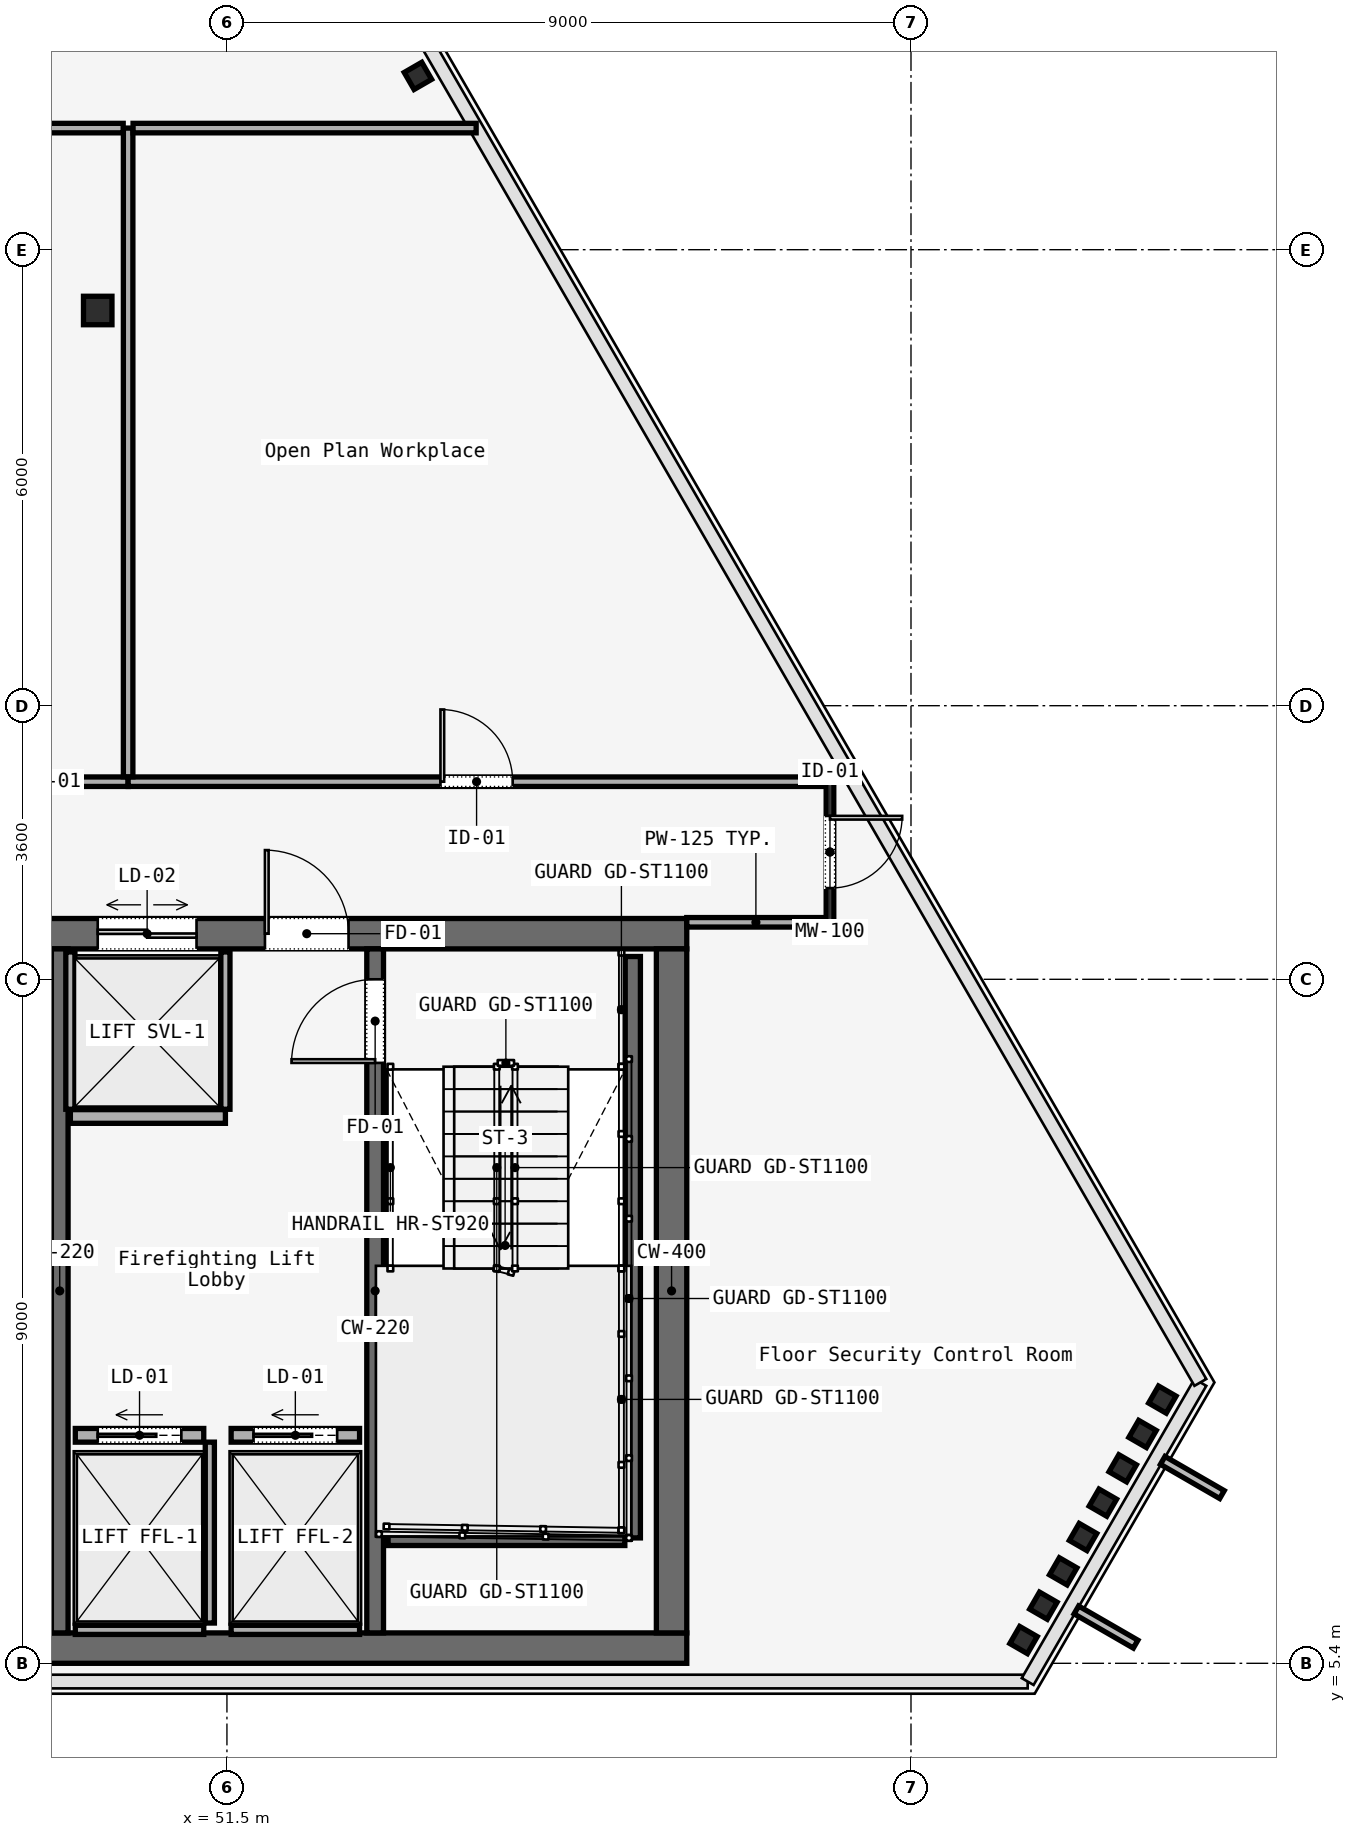
"""IFC4 building model, lengths in metres.
Left out: names, types, materials, properties, quantities, classifications, styles, units other than length and angle.
Written with IfcOpenShell. Run it as: python <this file> out.ifc"""

import sys

from ifc_helpers import new_model, si_unit, direction, frame, frame_2d, origin, origin_2d, place, context, subcontext, project, spatial, rectangle, i_section, extrude, element, fill, save


model = new_model("IFC4")
c1 = context("Model", 3, precision=1e-05, world=origin(), true_north=direction((0.0, 1.0)))
c2 = subcontext(c1, "Body", "Model", "MODEL_VIEW")
j1 = project(units=[si_unit("LENGTHUNIT", "METRE"), si_unit("PLANEANGLEUNIT", "RADIAN")], contexts=[c1])
p1 = place(None, origin())
s1 = spatial("IfcSite", under=j1, at=p1, CompositionType="ELEMENT")
p2 = place(p1, origin())
s2 = spatial("IfcBuilding", under=s1, at=p2, CompositionType="ELEMENT")
p3 = place(p2, frame((0.0, 0.0, 290.9)))
s3 = spatial("IfcBuildingStorey", under=s2, at=p3, CompositionType="ELEMENT", Elevation=290.9)
p4 = place(p3, frame((26.45, 15.0, 0.0), z_axis=(0.0, 0.0, 1.0), x_axis=(1.0, 0.0, 0.0)))
e1 = element("IfcWall", 1, at=p4, inside=s3, PredefinedType="SOLIDWALL", context=c2, shape_type="SweptSolid", body=[
    extrude(rectangle(XDim=31.1, YDim=0.4, at=frame_2d((15.55, 0.0))), origin(), (0.0, 0.0, 1.0), 3.58),
])
p5 = place(p4, frame((1.65, 0.0, 0.0)))
e2 = element("IfcOpeningElement", 2, at=p5, cuts=e1, PredefinedType="OPENING", context=c2, shape_type="SweptSolid", body=[
    extrude(rectangle(XDim=1.1, YDim=2.2, at=frame_2d((0.55, 1.1))), frame((0.0, 0.2, 0.0), z_axis=(0.0, -1.0, 0.0), x_axis=(1.0, 0.0, 0.0)), (0.0, 0.0, 1.0), 0.4),
])
p6 = place(p4, frame((13.65, 0.0, 0.0)))
e3 = element("IfcOpeningElement", 3, at=p6, cuts=e1, PredefinedType="OPENING", context=c2, shape_type="SweptSolid", body=[
    extrude(rectangle(XDim=1.1, YDim=2.2, at=frame_2d((0.55, 1.1))), frame((0.0, 0.2, 0.0), z_axis=(0.0, -1.0, 0.0), x_axis=(1.0, 0.0, 0.0)), (0.0, 0.0, 1.0), 0.4),
])
p7 = place(p4, frame((25.55, 0.0, 0.0)))
e4 = element("IfcOpeningElement", 4, at=p7, cuts=e1, PredefinedType="OPENING", context=c2, shape_type="SweptSolid", body=[
    extrude(rectangle(XDim=1.1, YDim=2.2, at=frame_2d((0.55, 1.1))), frame((0.0, 0.2, 0.0), z_axis=(0.0, -1.0, 0.0), x_axis=(1.0, 0.0, 0.0)), (0.0, 0.0, 1.0), 0.4),
])
p8 = place(p4, frame((19.35, 0.0, 0.0)))
e5 = element("IfcOpeningElement", 5, at=p8, cuts=e1, PredefinedType="OPENING", context=c2, shape_type="SweptSolid", body=[
    extrude(rectangle(XDim=1.1, YDim=2.2, at=frame_2d((0.55, 1.1))), frame((0.0, 0.2, 0.0), z_axis=(0.0, -1.0, 0.0), x_axis=(1.0, 0.0, 0.0)), (0.0, 0.0, 1.0), 0.4),
])
p9 = place(p4, frame((21.4, 0.0, 0.0)))
e6 = element("IfcOpeningElement", 6, at=p9, cuts=e1, PredefinedType="OPENING", context=c2, shape_type="SweptSolid", body=[
    extrude(rectangle(XDim=0.9, YDim=2.1, at=frame_2d((0.45, 1.05))), frame((0.0, 0.2, 0.0), z_axis=(0.0, -1.0, 0.0), x_axis=(1.0, 0.0, 0.0)), (0.0, 0.0, 1.0), 0.4),
])
p10 = place(p4, frame((5.54, 0.0, 0.0)))
e7 = element("IfcOpeningElement", 7, at=p10, cuts=e1, PredefinedType="OPENING", context=c2, shape_type="SweptSolid", body=[
    extrude(rectangle(XDim=0.95, YDim=2.2, at=frame_2d((0.475, 1.1))), frame((0.0, 0.2, 0.0), z_axis=(0.0, -1.0, 0.0), x_axis=(1.0, 0.0, 0.0)), (0.0, 0.0, 1.0), 0.4),
])
p11 = place(p4, frame((9.49, 0.0, 0.0)))
e8 = element("IfcOpeningElement", 8, at=p11, cuts=e1, PredefinedType="OPENING", context=c2, shape_type="SweptSolid", body=[
    extrude(rectangle(XDim=0.95, YDim=2.2, at=frame_2d((0.475, 1.1))), frame((0.0, 0.2, 0.0), z_axis=(0.0, -1.0, 0.0), x_axis=(1.0, 0.0, 0.0)), (0.0, 0.0, 1.0), 0.4),
])
p12 = place(p4, frame((23.35, 0.0, 0.0)))
e9 = element("IfcOpeningElement", 9, at=p12, cuts=e1, PredefinedType="OPENING", context=c2, shape_type="SweptSolid", body=[
    extrude(rectangle(XDim=1.3, YDim=2.3, at=frame_2d((0.65, 1.15))), frame((0.0, 0.2, 0.0), z_axis=(0.0, -1.0, 0.0), x_axis=(1.0, 0.0, 0.0)), (0.0, 0.0, 1.0), 0.4),
])
p13 = place(p3, frame((26.45, 5.6, 0.0), z_axis=(0.0, 0.0, 1.0), x_axis=(1.0, 0.0, 0.0)))
e10 = element("IfcWall", 10, at=p13, inside=s3, PredefinedType="SOLIDWALL", context=c2, shape_type="SweptSolid", body=[
    extrude(rectangle(XDim=31.1, YDim=0.4, at=frame_2d((15.55, 0.0))), origin(), (0.0, 0.0, 1.0), 3.58),
])
p14 = place(p3, frame((57.35, 5.8, 0.0), z_axis=(0.0, 0.0, 1.0), x_axis=(0.0, 1.0, 0.0)))
e11 = element("IfcWall", 11, at=p14, inside=s3, PredefinedType="SOLIDWALL", context=c2, shape_type="SweptSolid", body=[
    extrude(rectangle(XDim=9.0, YDim=0.4, at=frame_2d((4.5, 0.0))), origin(), (0.0, 0.0, 1.0), 3.58),
])
p15 = place(p3, frame((49.3, 5.8, 0.0), z_axis=(0.0, 0.0, 1.0), x_axis=(0.0, 1.0, 0.0)))
e12 = element("IfcWall", 12, at=p15, inside=s3, PredefinedType="SOLIDWALL", context=c2, shape_type="SweptSolid", body=[
    extrude(rectangle(XDim=9.0, YDim=0.22, at=frame_2d((4.5, 0.0))), origin(), (0.0, 0.0, 1.0), 3.58),
])
p16 = place(p3, frame((53.45, 5.8, 0.0), z_axis=(0.0, 0.0, 1.0), x_axis=(0.0, 1.0, 0.0)))
e13 = element("IfcWall", 13, at=p16, inside=s3, PredefinedType="SOLIDWALL", context=c2, shape_type="SweptSolid", body=[
    extrude(rectangle(XDim=9.0, YDim=0.22, at=frame_2d((4.5, 0.0))), origin(), (0.0, 0.0, 1.0), 3.58),
])
p17 = place(p16, frame((7.5, 0.0, 0.0)))
e14 = element("IfcOpeningElement", 14, at=p17, cuts=e13, PredefinedType="OPENING", context=c2, shape_type="SweptSolid", body=[
    extrude(rectangle(XDim=1.1, YDim=2.2, at=frame_2d((0.55, 1.1))), frame((0.0, 0.11, 0.0), z_axis=(0.0, -1.0, 0.0), x_axis=(1.0, 0.0, 0.0)), (0.0, 0.0, 1.0), 0.22),
])
p18 = place(p3, frame((49.8, 23.2, 0.0), z_axis=(0.0, 0.0, 1.0), x_axis=(1.0, 0.0, 0.0)))
e15 = element("IfcColumn", 15, at=p18, inside=s3, PredefinedType="COLUMN", context=c2, shape_type="SweptSolid", body=[
    extrude(i_section(OverallWidth=0.375, OverallDepth=0.375, WebThickness=0.017, FlangeThickness=0.027, FilletRadius=0.015, at=origin_2d()), origin(), (0.0, 0.0, 1.0), 3.58),
])
p19 = place(p3, frame((61.981, 5.706, 0.0), z_axis=(0.012750869074, -0.008046002945, 0.999886332127), x_axis=(-0.46549137214, 0.884956095151, 0.013057263081)))
e16 = element("IfcColumn", 16, at=p19, inside=s3, PredefinedType="COLUMN", context=c2, shape_type="SweptSolid", body=[
    extrude(i_section(OverallWidth=0.259, OverallDepth=0.267, WebThickness=0.013, FlangeThickness=0.021, FilletRadius=0.013, at=origin_2d()), origin(), (0.0, 0.0, 1.0), 3.581),
])
p20 = place(p3, frame((62.242, 6.158, 0.0), z_axis=(0.003476876794, -0.024065441336, 0.999704339223), x_axis=(0.371064507273, 0.928368302905, 0.021057673285)))
e17 = element("IfcColumn", 17, at=p20, inside=s3, PredefinedType="COLUMN", context=c2, shape_type="SweptSolid", body=[
    extrude(i_section(OverallWidth=0.259, OverallDepth=0.267, WebThickness=0.013, FlangeThickness=0.021, FilletRadius=0.013, at=origin_2d()), origin(), (0.0, 0.0, 1.0), 3.581),
])
p21 = place(p3, frame((62.503, 6.61, 0.0), z_axis=(-0.005791741097, -0.040133358895, 0.999177546404), x_axis=(0.618468463563, 0.785024577009, 0.035116564052)))
e18 = element("IfcColumn", 18, at=p21, inside=s3, PredefinedType="COLUMN", context=c2, shape_type="SweptSolid", body=[
    extrude(i_section(OverallWidth=0.259, OverallDepth=0.267, WebThickness=0.013, FlangeThickness=0.021, FilletRadius=0.013, at=origin_2d()), origin(), (0.0, 0.0, 1.0), 3.583),
])
p22 = place(p3, frame((62.764, 7.062, 0.0), z_axis=(-0.01504542395, -0.056165044156, 0.998308130305), x_axis=(0.706681200924, 0.705737927659, 0.050355314766)))
e19 = element("IfcColumn", 19, at=p22, inside=s3, PredefinedType="COLUMN", context=c2, shape_type="SweptSolid", body=[
    extrude(i_section(OverallWidth=0.259, OverallDepth=0.267, WebThickness=0.013, FlangeThickness=0.021, FilletRadius=0.013, at=origin_2d()), origin(), (0.0, 0.0, 1.0), 3.586),
])
p23 = place(p3, frame((63.025, 7.514, 0.0), z_axis=(-0.024274823165, -0.072076505755, 0.997103660749), x_axis=(0.749462086186, 0.658762752498, 0.065865144737)))
e20 = element("IfcColumn", 20, at=p23, inside=s3, PredefinedType="COLUMN", context=c2, shape_type="SweptSolid", body=[
    extrude(i_section(OverallWidth=0.259, OverallDepth=0.267, WebThickness=0.013, FlangeThickness=0.021, FilletRadius=0.013, at=origin_2d()), origin(), (0.0, 0.0, 1.0), 3.591),
])
p24 = place(p3, frame((63.286, 7.966, 0.0), z_axis=(-0.033470647913, -0.087919856081, 0.995565073029), x_axis=(0.774036446069, 0.627877329686, 0.081471706891)))
e21 = element("IfcColumn", 21, at=p24, inside=s3, PredefinedType="COLUMN", context=c2, shape_type="SweptSolid", body=[
    extrude(i_section(OverallWidth=0.259, OverallDepth=0.267, WebThickness=0.013, FlangeThickness=0.021, FilletRadius=0.013, at=origin_2d()), origin(), (0.0, 0.0, 1.0), 3.596),
])
p25 = place(p3, frame((63.546, 8.418, 0.0), z_axis=(-0.042555860906, -0.103746851986, 0.993692904979), x_axis=(0.789181806641, 0.606433234677, 0.097112347031)))
e22 = element("IfcColumn", 22, at=p25, inside=s3, PredefinedType="COLUMN", context=c2, shape_type="SweptSolid", body=[
    extrude(i_section(OverallWidth=0.259, OverallDepth=0.267, WebThickness=0.013, FlangeThickness=0.021, FilletRadius=0.013, at=origin_2d()), origin(), (0.0, 0.0, 1.0), 3.603),
])
p26 = place(p3, frame((63.807, 8.87, 0.0), z_axis=(-0.051724991926, -0.119406974825, 0.991497100134), x_axis=(0.80011318397, 0.589167860222, 0.112694832712)))
e23 = element("IfcColumn", 23, at=p26, inside=s3, PredefinedType="COLUMN", context=c2, shape_type="SweptSolid", body=[
    extrude(i_section(OverallWidth=0.259, OverallDepth=0.267, WebThickness=0.013, FlangeThickness=0.021, FilletRadius=0.013, at=origin_2d()), origin(), (0.0, 0.0, 1.0), 3.611),
])
p27 = place(p3, frame((54.013, 26.287, 0.0), z_axis=(-0.064911794707, -0.112513777493, 0.991527664154), x_axis=(-0.003987046067, 0.993644521472, 0.112492970506)))
e24 = element("IfcColumn", 24, at=p27, inside=s3, PredefinedType="COLUMN", context=c2, shape_type="SweptSolid", body=[
    extrude(i_section(OverallWidth=0.259, OverallDepth=0.267, WebThickness=0.013, FlangeThickness=0.021, FilletRadius=0.013, at=origin_2d()), origin(), (0.0, 0.0, 1.0), 3.611),
])
p28 = place(p3, frame((56.84, 14.7, 0.0), z_axis=(0.0, 0.0, 1.0), x_axis=(0.0, -1.0, 0.0)))
e25 = element("IfcWall", 25, at=p28, inside=s3, PredefinedType="SOLIDWALL", context=c2, shape_type="SweptSolid", body=[
    extrude(rectangle(XDim=7.65, YDim=0.2, at=frame_2d((3.825, 0.0))), origin(), (0.0, 0.0, 1.0), 3.8),
])
p29 = place(p3, frame((53.62, 7.05, 0.0), z_axis=(0.0, 0.0, 1.0), x_axis=(1.0, 0.0, 0.0)))
e26 = element("IfcWall", 26, at=p29, inside=s3, PredefinedType="SOLIDWALL", context=c2, shape_type="SweptSolid", body=[
    extrude(rectangle(XDim=3.115, YDim=0.2, at=frame_2d((1.558, 0.0))), origin(), (0.0, 0.0, 1.0), 3.8),
])
p30 = place(p3, frame((49.505, 8.4, 0.0), z_axis=(0.0, 0.0, 1.0), x_axis=(1.0, 0.0, 0.0)))
e27 = element("IfcWall", 27, at=p30, inside=s3, PredefinedType="SOLIDWALL", context=c2, shape_type="SweptSolid", body=[
    extrude(rectangle(XDim=1.69, YDim=0.18, at=frame_2d((0.845, 0.0))), origin(), (0.0, 0.0, 1.0), 3.01),
])
p31 = place(p30, frame((0.295, 0.0, 0.0)))
e28 = element("IfcOpeningElement", 28, at=p31, cuts=e27, PredefinedType="OPENING", context=c2, shape_type="SweptSolid", body=[
    extrude(rectangle(XDim=1.1, YDim=2.2, at=frame_2d((0.55, 1.1))), frame((0.0, 0.09, 0.0), z_axis=(0.0, -1.0, 0.0), x_axis=(1.0, 0.0, 0.0)), (0.0, 0.0, 1.0), 0.18),
])
p32 = place(p3, frame((49.505, 5.84, 0.0), z_axis=(0.0, 0.0, 1.0), x_axis=(1.0, 0.0, 0.0)))
e29 = element("IfcWall", 29, at=p32, inside=s3, PredefinedType="SOLIDWALL", context=c2, shape_type="SweptSolid", body=[
    extrude(rectangle(XDim=1.69, YDim=0.12, at=frame_2d((0.845, 0.0))), origin(), (0.0, 0.0, 1.0), 3.01),
])
p33 = place(p3, frame((51.275, 5.93, 0.0), z_axis=(0.0, 0.0, 1.0), x_axis=(0.0, 1.0, 0.0)))
e30 = element("IfcWall", 30, at=p33, inside=s3, PredefinedType="SOLIDWALL", context=c2, shape_type="SweptSolid", body=[
    extrude(rectangle(XDim=2.38, YDim=0.12, at=frame_2d((1.19, 0.0))), origin(), (0.0, 0.0, 1.0), 3.01),
])
p34 = place(p3, frame((51.555, 8.4, 0.0), z_axis=(0.0, 0.0, 1.0), x_axis=(1.0, 0.0, 0.0)))
e31 = element("IfcWall", 31, at=p34, inside=s3, PredefinedType="SOLIDWALL", context=c2, shape_type="SweptSolid", body=[
    extrude(rectangle(XDim=1.69, YDim=0.18, at=frame_2d((0.845, 0.0))), origin(), (0.0, 0.0, 1.0), 3.01),
])
p35 = place(p34, frame((0.295, 0.0, 0.0)))
e32 = element("IfcOpeningElement", 32, at=p35, cuts=e31, PredefinedType="OPENING", context=c2, shape_type="SweptSolid", body=[
    extrude(rectangle(XDim=1.1, YDim=2.2, at=frame_2d((0.55, 1.1))), frame((0.0, 0.09, 0.0), z_axis=(0.0, -1.0, 0.0), x_axis=(1.0, 0.0, 0.0)), (0.0, 0.0, 1.0), 0.18),
])
p36 = place(p3, frame((51.555, 5.84, 0.0), z_axis=(0.0, 0.0, 1.0), x_axis=(1.0, 0.0, 0.0)))
e33 = element("IfcWall", 33, at=p36, inside=s3, PredefinedType="SOLIDWALL", context=c2, shape_type="SweptSolid", body=[
    extrude(rectangle(XDim=1.69, YDim=0.12, at=frame_2d((0.845, 0.0))), origin(), (0.0, 0.0, 1.0), 3.01),
])
p37 = place(p3, frame((49.44, 12.595, 0.0), z_axis=(0.0, 0.0, 1.0), x_axis=(1.0, 0.0, 0.0)))
e34 = element("IfcWall", 34, at=p37, inside=s3, PredefinedType="SOLIDWALL", context=c2, shape_type="SweptSolid", body=[
    extrude(rectangle(XDim=2.04, YDim=0.18, at=frame_2d((1.02, 0.0))), origin(), (0.0, 0.0, 1.0), 3.01),
])
for number, where, z_axis, x_axis in (
    (35, (49.44, 12.69, 0.0), (0.0, 0.0, 1.0), (0.0, 1.0, 0.0)),
    (36, (51.48, 12.69, 0.0), (0.0, 0.0, 1.0), (0.0, 1.0, 0.0)),
):
    element("IfcWall", number, at=place(p3, frame(where, z_axis=z_axis, x_axis=x_axis)), inside=s3, PredefinedType="SOLIDWALL", context=c2, shape_type="SweptSolid", body=[
        extrude(rectangle(XDim=2.07, YDim=0.12, at=frame_2d((1.035, 0.0))), origin(), (0.0, 0.0, 1.0), 3.01),
    ])
p38 = place(p3, frame((59.434, 17.0, 0.0), z_axis=(0.0, 0.0, 1.0), x_axis=(0.0, -1.0, 0.0)))
e37 = element("IfcWall", 37, at=p38, inside=s3, PredefinedType="MOVABLE", context=c2, shape_type="SweptSolid", body=[
    extrude(rectangle(XDim=1.85, YDim=0.1, at=frame_2d((0.925, 0.0))), origin(), (0.0, 0.0, 1.0), 3.01),
])
p39 = place(p38, frame((0.45, 0.0, 0.0)))
e38 = element("IfcOpeningElement", 38, at=p39, cuts=e37, PredefinedType="OPENING", context=c2, shape_type="SweptSolid", body=[
    extrude(rectangle(XDim=0.95, YDim=2.2, at=frame_2d((0.475, 1.1))), frame((0.0, 0.05, 0.0), z_axis=(0.0, -1.0, 0.0), x_axis=(1.0, 0.0, 0.0)), (0.0, 0.0, 1.0), 0.1),
])
p40 = place(p3, frame((59.369, 15.15, 0.0), z_axis=(0.0, 0.0, 1.0), x_axis=(-1.0, 0.0, 0.0)))
e39 = element("IfcWall", 39, at=p40, inside=s3, PredefinedType="PARTITIONING", context=c2, shape_type="SweptSolid", body=[
    extrude(rectangle(XDim=1.819, YDim=0.125, at=frame_2d((0.909, 0.0))), origin(), (0.0, 0.0, 1.0), 3.01),
])
p41 = place(p3, frame((45.4, 17.0, 0.0), z_axis=(0.0, 0.0, 1.0), x_axis=(1.0, 0.0, 0.0)))
e40 = element("IfcWall", 40, at=p41, inside=s3, PredefinedType="PARTITIONING", context=c2, shape_type="SweptSolid", body=[
    extrude(rectangle(XDim=4.8, YDim=0.125, at=frame_2d((2.4, 0.0))), origin(), (0.0, 0.0, 1.0), 3.01),
])
p42 = place(p41, frame((1.925, 0.0, 0.0)))
e41 = element("IfcOpeningElement", 41, at=p42, cuts=e40, PredefinedType="OPENING", context=c2, shape_type="SweptSolid", body=[
    extrude(rectangle(XDim=0.95, YDim=2.2, at=frame_2d((0.475, 1.1))), frame((0.0, 0.062, 0.0), z_axis=(0.0, -1.0, 0.0), x_axis=(1.0, 0.0, 0.0)), (0.0, 0.0, 1.0), 0.125),
])
p43 = place(p3, frame((50.2, 17.0, 0.0), z_axis=(0.0, 0.0, 1.0), x_axis=(1.0, 0.0, 0.0)))
e42 = element("IfcWall", 42, at=p43, inside=s3, PredefinedType="PARTITIONING", context=c2, shape_type="SweptSolid", body=[
    extrude(rectangle(XDim=9.169, YDim=0.125, at=frame_2d((4.584, 0.0))), origin(), (0.0, 0.0, 1.0), 3.01),
])
p44 = place(p43, frame((4.11, 0.0, 0.0)))
e43 = element("IfcOpeningElement", 43, at=p44, cuts=e42, PredefinedType="OPENING", context=c2, shape_type="SweptSolid", body=[
    extrude(rectangle(XDim=0.95, YDim=2.2, at=frame_2d((0.475, 1.1))), frame((0.0, 0.062, 0.0), z_axis=(0.0, -1.0, 0.0), x_axis=(1.0, 0.0, 0.0)), (0.0, 0.0, 1.0), 0.125),
])
p45 = place(p3, frame((50.2, 17.065, 0.0), z_axis=(0.0, 0.0, 1.0), x_axis=(0.0, 1.0, 0.0)))
e44 = element("IfcWall", 44, at=p45, inside=s3, PredefinedType="PARTITIONING", context=c2, shape_type="SweptSolid", body=[
    extrude(rectangle(XDim=8.535, YDim=0.125, at=frame_2d((4.268, 0.0))), origin(), (0.0, 0.0, 1.0), 3.01),
])
p46 = place(p3, frame((50.265, 25.6, 0.0), z_axis=(0.0, 0.0, 1.0), x_axis=(1.0, 0.0, 0.0)))
e45 = element("IfcWall", 45, at=p46, inside=s3, PredefinedType="PARTITIONING", context=c2, shape_type="SweptSolid", body=[
    extrude(rectangle(XDim=4.514, YDim=0.125, at=frame_2d((2.257, 0.0))), origin(), (0.0, 0.0, 1.0), 3.01),
])
p47 = place(p3, frame((47.2, 25.6, 0.0), z_axis=(0.0, 0.0, 1.0), x_axis=(1.0, 0.0, 0.0)))
e46 = element("IfcWall", 46, at=p47, inside=s3, PredefinedType="PARTITIONING", context=c2, shape_type="SweptSolid", body=[
    extrude(rectangle(XDim=2.935, YDim=0.125, at=frame_2d((1.468, 0.0))), origin(), (0.0, 0.0, 1.0), 3.01),
])
p48 = place(p7, origin())
e47 = element("IfcDoor", 47, at=p48, inside=s3, OperationType="SINGLE_SWING_RIGHT", PredefinedType="DOOR", context=c2, shape_type="SweptSolid", body=[
    extrude(rectangle(XDim=1.1, YDim=2.2, at=frame_2d((0.55, 1.1))), frame((0.0, 0.025, 0.0), z_axis=(0.0, -1.0, 0.0), x_axis=(1.0, 0.0, 0.0)), (0.0, 0.0, 1.0), 0.05),
])
fill(e4, e47)
p49 = place(p17, origin())
e48 = element("IfcDoor", 48, at=p49, inside=s3, OperationType="SINGLE_SWING_LEFT", PredefinedType="DOOR", context=c2, shape_type="SweptSolid", body=[
    extrude(rectangle(XDim=1.1, YDim=2.2, at=frame_2d((0.55, 1.1))), frame((0.0, 0.025, 0.0), z_axis=(0.0, -1.0, 0.0), x_axis=(1.0, 0.0, 0.0)), (0.0, 0.0, 1.0), 0.05),
])
fill(e14, e48)
p50 = place(p31, origin())
e49 = element("IfcDoor", 49, at=p50, inside=s3, OperationType="SLIDING_TO_LEFT", PredefinedType="DOOR", context=c2, shape_type="SweptSolid", body=[
    extrude(rectangle(XDim=1.1, YDim=2.2, at=frame_2d((0.55, 1.1))), frame((0.0, 0.025, 0.0), z_axis=(0.0, -1.0, 0.0), x_axis=(1.0, 0.0, 0.0)), (0.0, 0.0, 1.0), 0.05),
])
fill(e28, e49)
p51 = place(p35, origin())
e50 = element("IfcDoor", 50, at=p51, inside=s3, OperationType="SLIDING_TO_LEFT", PredefinedType="DOOR", context=c2, shape_type="SweptSolid", body=[
    extrude(rectangle(XDim=1.1, YDim=2.2, at=frame_2d((0.55, 1.1))), frame((0.0, 0.025, 0.0), z_axis=(0.0, -1.0, 0.0), x_axis=(1.0, 0.0, 0.0)), (0.0, 0.0, 1.0), 0.05),
])
fill(e32, e50)
p52 = place(p12, origin())
e51 = element("IfcDoor", 51, at=p52, inside=s3, OperationType="DOUBLE_DOOR_SLIDING", PredefinedType="DOOR", context=c2, shape_type="SweptSolid", body=[
    extrude(rectangle(XDim=1.3, YDim=2.3, at=frame_2d((0.65, 1.15))), frame((0.0, 0.025, 0.0), z_axis=(0.0, -1.0, 0.0), x_axis=(1.0, 0.0, 0.0)), (0.0, 0.0, 1.0), 0.05),
])
fill(e9, e51)
p53 = place(p39, origin())
e52 = element("IfcDoor", 52, at=p53, inside=s3, OperationType="SINGLE_SWING_LEFT", PredefinedType="DOOR", context=c2, shape_type="SweptSolid", body=[
    extrude(rectangle(XDim=0.95, YDim=2.2, at=frame_2d((0.475, 1.1))), frame((0.0, 0.025, 0.0), z_axis=(0.0, -1.0, 0.0), x_axis=(1.0, 0.0, 0.0)), (0.0, 0.0, 1.0), 0.05),
])
fill(e38, e52)
p54 = place(p44, origin())
e53 = element("IfcDoor", 53, at=p54, inside=s3, OperationType="SINGLE_SWING_LEFT", PredefinedType="DOOR", context=c2, shape_type="SweptSolid", body=[
    extrude(rectangle(XDim=0.95, YDim=2.2, at=frame_2d((0.475, 1.1))), frame((0.0, 0.025, 0.0), z_axis=(0.0, -1.0, 0.0), x_axis=(1.0, 0.0, 0.0)), (0.0, 0.0, 1.0), 0.05),
])
fill(e43, e53)
save(model, sys.argv[1])
